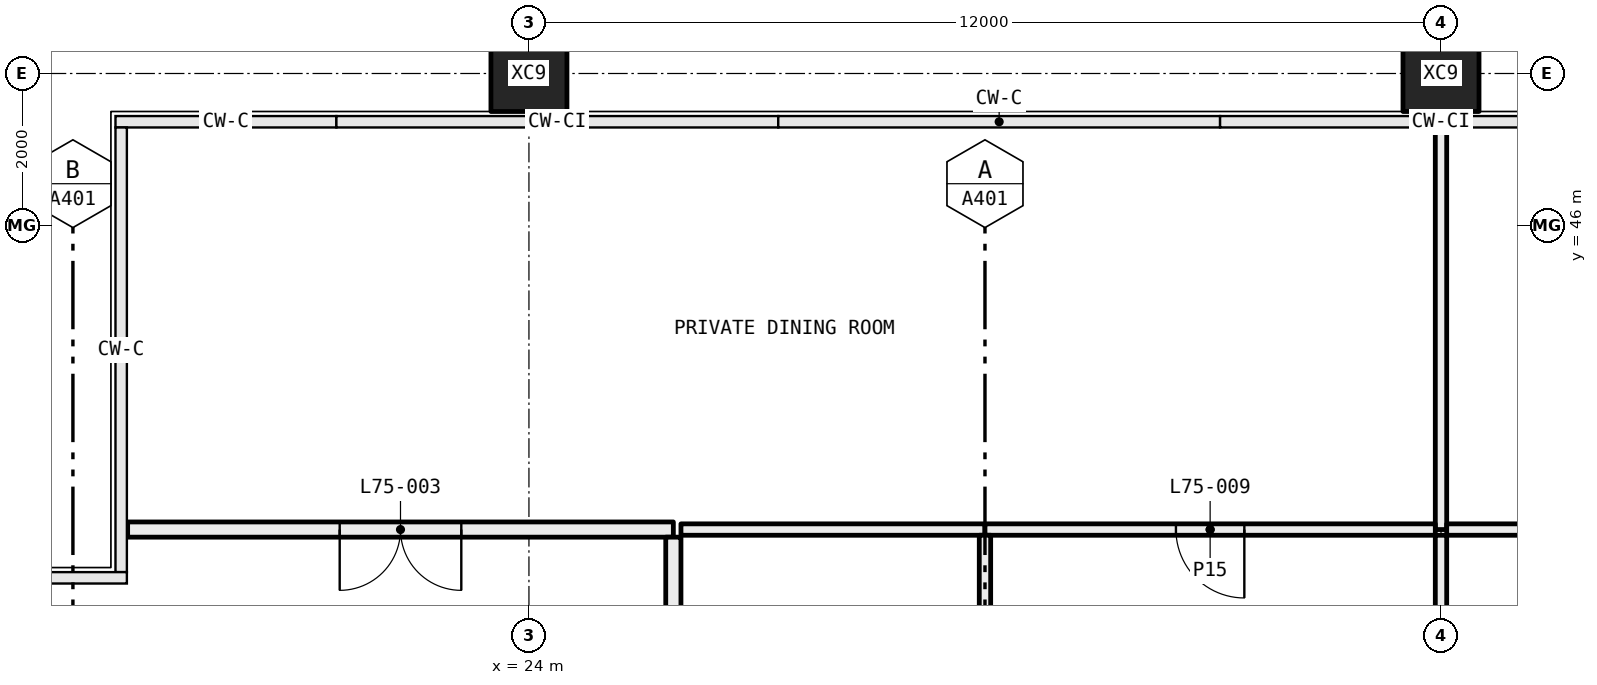
"""IFC4 building model, lengths in metres.
Left out: names, types, materials, properties, quantities, classifications, styles, units other than length and angle.
Written with IfcOpenShell. Run it as: python <this file> out.ifc"""

import sys

from ifc_helpers import new_model, si_unit, direction, frame, frame_2d, origin, origin_2d, place, context, subcontext, project, spatial, rectangle, hollow_rectangle, extrude, element, fill, save


model = new_model("IFC4")
c1 = context("Model", 3, precision=1e-05, world=origin(), true_north=direction((0.0, 1.0)))
c2 = subcontext(c1, "Body", "Model", "MODEL_VIEW")
j1 = project(units=[si_unit("LENGTHUNIT", "METRE"), si_unit("PLANEANGLEUNIT", "RADIAN")], contexts=[c1])
p1 = place(None, origin())
s1 = spatial("IfcSite", under=j1, at=p1, CompositionType="ELEMENT")
p2 = place(p1, origin())
s2 = spatial("IfcBuilding", under=s1, at=p2, CompositionType="ELEMENT")
p3 = place(p2, frame((0.0, 0.0, 277.95)))
s3 = spatial("IfcBuildingStorey", under=s2, at=p3, CompositionType="ELEMENT", Elevation=277.95)
for number, where, z_axis, x_axis in (
    (1, (24.0, 48.0, -0.4), (0.0, 0.0, 1.0), (1.0, 0.0, 0.0)),
    (2, (36.0, 48.0, -0.4), (0.0, 0.0, 1.0), (1.0, 0.0, 0.0)),
):
    element("IfcColumn", number, at=place(p3, frame(where, z_axis=z_axis, x_axis=x_axis)), inside=s3, PredefinedType="COLUMN", context=c2, shape_type="SweptSolid", body=[
        extrude(hollow_rectangle(XDim=1.0, YDim=1.0, WallThickness=0.036, at=origin_2d()), origin(), (0.0, 0.0, 1.0), 5.4),
    ])
p4 = place(p3, frame((25.9, 42.0, 0.0), z_axis=(0.0, 0.0, 1.0), x_axis=(-1.0, 0.0, 0.0)))
e3 = element("IfcWall", 3, at=p4, inside=s3, PredefinedType="PARTITIONING", context=c2, shape_type="SweptSolid", body=[
    extrude(rectangle(XDim=7.18, YDim=0.2, at=frame_2d((3.59, 0.0))), origin(), (0.0, 0.0, 1.0), 5.0),
])
p5 = place(p4, frame((2.79, 0.0, 0.0)))
e4 = element("IfcOpeningElement", 4, at=p5, cuts=e3, PredefinedType="OPENING", context=c2, shape_type="SweptSolid", body=[
    extrude(rectangle(XDim=1.6, YDim=2.1, at=frame_2d((0.8, 1.05))), frame((0.0, 0.11, 0.0), z_axis=(0.0, -1.0, 0.0), x_axis=(1.0, 0.0, 0.0)), (0.0, 0.0, 1.0), 0.22),
])
p6 = place(p3, frame((25.9, 37.5, 0.0), z_axis=(0.0, 0.0, 1.0), x_axis=(0.0, 1.0, 0.0)))
e5 = element("IfcWall", 5, at=p6, inside=s3, PredefinedType="PARTITIONING", context=c2, shape_type="SweptSolid", body=[
    extrude(rectangle(XDim=4.4, YDim=0.2, at=frame_2d((2.2, 0.0))), origin(), (0.0, 0.0, 1.0), 5.0),
])
p7 = place(p6, frame((1.75, 0.0, 0.0)))
e6 = element("IfcOpeningElement", 6, at=p7, cuts=e5, PredefinedType="OPENING", context=c2, shape_type="SweptSolid", body=[
    extrude(rectangle(XDim=0.9, YDim=2.1, at=frame_2d((0.45, 1.05))), frame((0.0, 0.11, 0.0), z_axis=(0.0, -1.0, 0.0), x_axis=(1.0, 0.0, 0.0)), (0.0, 0.0, 1.0), 0.22),
])
p8 = place(p3, frame((36.0, 42.0, 0.0), z_axis=(0.0, 0.0, 1.0), x_axis=(0.0, 1.0, 0.0)))
e7 = element("IfcWall", 7, at=p8, inside=s3, PredefinedType="PARTITIONING", context=c2, shape_type="SweptSolid", body=[
    extrude(rectangle(XDim=5.28, YDim=0.15, at=frame_2d((2.64, 0.0))), origin(), (0.0, 0.0, 1.0), 4.1),
])
p9 = place(p3, frame((26.0, 42.0, 0.0), z_axis=(0.0, 0.0, 1.0), x_axis=(1.0, 0.0, 0.0)))
e8 = element("IfcWall", 8, at=p9, inside=s3, PredefinedType="PARTITIONING", context=c2, shape_type="SweptSolid", body=[
    extrude(rectangle(XDim=4.0, YDim=0.15, at=frame_2d((2.0, 0.0))), origin(), (0.0, 0.0, 1.0), 5.0),
])
p10 = place(p3, frame((30.0, 42.0, 0.0), z_axis=(0.0, 0.0, 1.0), x_axis=(1.0, 0.0, 0.0)))
e9 = element("IfcWall", 9, at=p10, inside=s3, PredefinedType="PARTITIONING", context=c2, shape_type="SweptSolid", body=[
    extrude(rectangle(XDim=5.925, YDim=0.15, at=frame_2d((2.962, 0.0))), origin(), (0.0, 0.0, 1.0), 5.0),
])
p11 = place(p10, frame((2.512, 0.0, 0.0)))
e10 = element("IfcOpeningElement", 10, at=p11, cuts=e9, PredefinedType="OPENING", context=c2, shape_type="SweptSolid", body=[
    extrude(rectangle(XDim=0.9, YDim=2.1, at=frame_2d((0.45, 1.05))), frame((0.0, 0.085, 0.0), z_axis=(0.0, -1.0, 0.0), x_axis=(1.0, 0.0, 0.0)), (0.0, 0.0, 1.0), 0.17),
])
p12 = place(p3, frame((36.075, 42.0, 0.0), z_axis=(0.0, 0.0, 1.0), x_axis=(1.0, 0.0, 0.0)))
e11 = element("IfcWall", 11, at=p12, inside=s3, PredefinedType="PARTITIONING", context=c2, shape_type="SweptSolid", body=[
    extrude(rectangle(XDim=5.825, YDim=0.15, at=frame_2d((2.913, 0.0))), origin(), (0.0, 0.0, 1.0), 5.0),
])
p13 = place(p12, frame((2.462, 0.0, 0.0)))
e12 = element("IfcOpeningElement", 12, at=p13, cuts=e11, PredefinedType="OPENING", context=c2, shape_type="SweptSolid", body=[
    extrude(rectangle(XDim=0.9, YDim=2.1, at=frame_2d((0.45, 1.05))), frame((0.0, 0.085, 0.0), z_axis=(0.0, -1.0, 0.0), x_axis=(1.0, 0.0, 0.0)), (0.0, 0.0, 1.0), 0.17),
])
p14 = place(p3, frame((30.0, 37.5, 0.0), z_axis=(0.0, 0.0, 1.0), x_axis=(0.0, 1.0, 0.0)))
e13 = element("IfcWall", 13, at=p14, inside=s3, PredefinedType="PARTITIONING", context=c2, shape_type="SweptSolid", body=[
    extrude(rectangle(XDim=4.425, YDim=0.15, at=frame_2d((2.212, 0.0))), origin(), (0.0, 0.0, 1.0), 5.0),
])
p15 = place(p3, frame((36.0, 37.5, 0.0), z_axis=(0.0, 0.0, 1.0), x_axis=(0.0, 1.0, 0.0)))
e14 = element("IfcWall", 14, at=p15, inside=s3, PredefinedType="PARTITIONING", context=c2, shape_type="SweptSolid", body=[
    extrude(rectangle(XDim=4.425, YDim=0.15, at=frame_2d((2.212, 0.0))), origin(), (0.0, 0.0, 1.0), 4.1),
])
p16 = place(p5, origin())
e15 = element("IfcDoor", 15, at=p16, inside=s3, OperationType="DOUBLE_DOOR_SINGLE_SWING", PredefinedType="DOOR", context=c2, shape_type="SweptSolid", body=[
    extrude(rectangle(XDim=1.6, YDim=2.1, at=frame_2d((0.8, 1.05))), frame((0.0, 0.025, 0.0), z_axis=(0.0, -1.0, 0.0), x_axis=(1.0, 0.0, 0.0)), (0.0, 0.0, 1.0), 0.05),
])
fill(e4, e15)
p17 = place(p11, frame((0.9, 0.0, 0.0), x_axis=(-1.0, 0.0, 0.0)))
e16 = element("IfcDoor", 16, at=p17, inside=s3, OperationType="SINGLE_SWING_RIGHT", PredefinedType="DOOR", context=c2, shape_type="SweptSolid", body=[
    extrude(rectangle(XDim=0.9, YDim=2.1, at=frame_2d((0.45, 1.05))), frame((0.0, 0.025, 0.0), z_axis=(0.0, -1.0, 0.0), x_axis=(1.0, 0.0, 0.0)), (0.0, 0.0, 1.0), 0.05),
])
fill(e10, e16)
save(model, sys.argv[1])
